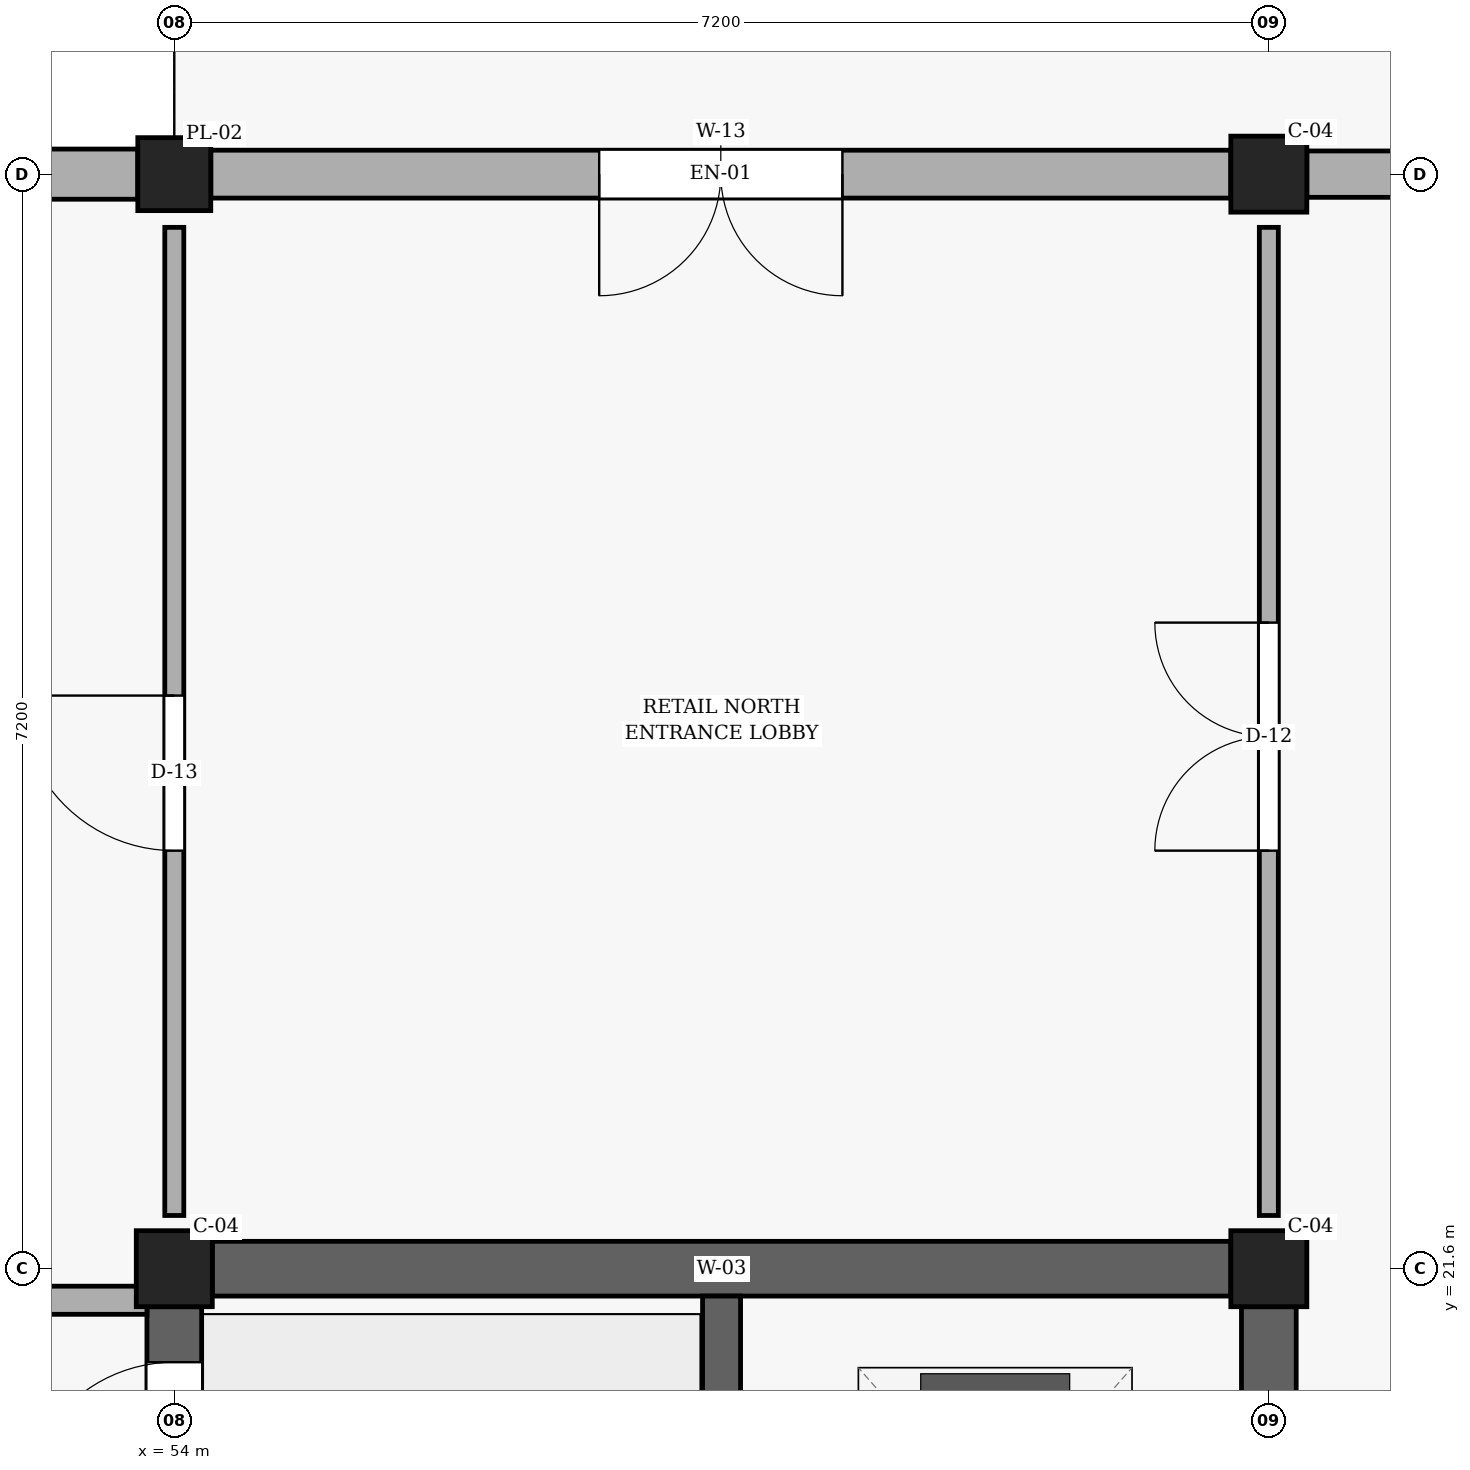
"""IFC4 building model, lengths in metres.
Left out: names, types, materials, properties, quantities, classifications, styles, units other than length and angle.
Written with IfcOpenShell. Run it as: python <this file> out.ifc"""

import sys

from ifc_helpers import new_model, si_unit, direction, frame, frame_2d, origin, origin_2d, place, context, subcontext, project, spatial, rectangle, extrude, element, fill, save


model = new_model("IFC4")
c1 = context("Model", 3, precision=1e-05, world=origin(), true_north=direction((0.0, 1.0)))
c2 = subcontext(c1, "Body", "Model", "MODEL_VIEW")
j1 = project(units=[si_unit("LENGTHUNIT", "METRE"), si_unit("PLANEANGLEUNIT", "RADIAN")], contexts=[c1])
p1 = place(None, origin())
s1 = spatial("IfcSite", under=j1, at=p1, CompositionType="ELEMENT")
p2 = place(p1, origin())
s2 = spatial("IfcBuilding", under=s1, at=p2, CompositionType="ELEMENT")
p3 = place(p2, origin())
s3 = spatial("IfcBuildingStorey", under=s2, at=p3, CompositionType="ELEMENT", Elevation=0.0)
p4 = place(p3, frame((54.0, 21.6, 0.0), z_axis=(0.0, 0.0, 1.0), x_axis=(1.0, 0.0, 0.0)))
e1 = element("IfcColumn", 1, at=p4, inside=s3, PredefinedType="COLUMN", context=c2, shape_type="SweptSolid", body=[
    extrude(rectangle(XDim=0.5, YDim=0.5, at=origin_2d()), origin(), (0.0, 0.0, 1.0), 4.5),
])
p5 = place(p3, frame((54.0, 28.8, 0.0), z_axis=(0.0, 0.0, 1.0), x_axis=(1.0, 0.0, 0.0)))
e2 = element("IfcColumn", 2, at=p5, inside=s3, PredefinedType="PILASTER", context=c2, shape_type="SweptSolid", body=[
    extrude(rectangle(XDim=0.48, YDim=0.48, at=origin_2d()), origin(), (0.0, 0.0, 1.0), 4.5),
])
for number, where, z_axis, x_axis in (
    (3, (61.2, 21.6, 0.0), (0.0, 0.0, 1.0), (1.0, 0.0, 0.0)),
    (4, (61.2, 28.8, 0.0), (0.0, 0.0, 1.0), (1.0, 0.0, 0.0)),
):
    element("IfcColumn", number, at=place(p3, frame(where, z_axis=z_axis, x_axis=x_axis)), inside=s3, PredefinedType="COLUMN", context=c2, shape_type="SweptSolid", body=[
        extrude(rectangle(XDim=0.5, YDim=0.5, at=origin_2d()), origin(), (0.0, 0.0, 1.0), 4.5),
    ])
p6 = place(p3, frame((68.15, 28.8, 0.0), z_axis=(0.0, 0.0, 1.0), x_axis=(-1.0, 0.0, 0.0)))
e5 = element("IfcWall", 5, at=p6, inside=s3, PredefinedType="SOLIDWALL", context=c2, shape_type="SweptSolid", body=[
    extrude(rectangle(XDim=6.7, YDim=0.305, at=frame_2d((3.35, 0.0))), origin(), (0.0, 0.0, 1.0), 3.83),
])
p7 = place(p6, frame((2.45, 0.0, 0.85)))
e6 = element("IfcOpeningElement", 6, at=p7, cuts=e5, PredefinedType="OPENING", context=c2, shape_type="SweptSolid", body=[
    extrude(rectangle(XDim=1.8, YDim=2.1, at=frame_2d((0.9, 1.05))), frame((0.0, 0.163, 0.0), z_axis=(0.0, -1.0, 0.0), x_axis=(1.0, 0.0, 0.0)), (0.0, 0.0, 1.0), 0.325),
])
p8 = place(p3, frame((60.95, 28.8, 0.0), z_axis=(0.0, 0.0, 1.0), x_axis=(-1.0, 0.0, 0.0)))
e7 = element("IfcWall", 7, at=p8, inside=s3, PredefinedType="SOLIDWALL", context=c2, shape_type="SweptSolid", body=[
    extrude(rectangle(XDim=6.71, YDim=0.315, at=frame_2d((3.355, 0.0))), origin(), (0.0, 0.0, 1.0), 3.83),
])
p9 = place(p8, frame((2.555, 0.0, 0.0)))
e8 = element("IfcOpeningElement", 8, at=p9, cuts=e7, PredefinedType="OPENING", context=c2, shape_type="SweptSolid", body=[
    extrude(rectangle(XDim=1.6, YDim=2.25, at=frame_2d((0.8, 1.125))), frame((0.0, 0.167, 0.0), z_axis=(0.0, -1.0, 0.0), x_axis=(1.0, 0.0, 0.0)), (0.0, 0.0, 1.0), 0.335),
])
p10 = place(p3, frame((53.76, 28.8, 0.0), z_axis=(0.0, 0.0, 1.0), x_axis=(-1.0, 0.0, 0.0)))
e9 = element("IfcWall", 9, at=p10, inside=s3, PredefinedType="SOLIDWALL", context=c2, shape_type="SweptSolid", body=[
    extrude(rectangle(XDim=6.71, YDim=0.33, at=frame_2d((3.355, 0.0))), origin(), (0.0, 0.0, 1.0), 3.83),
])
p11 = place(p10, frame((2.305, 0.0, 0.85)))
e10 = element("IfcOpeningElement", 10, at=p11, cuts=e9, PredefinedType="OPENING", context=c2, shape_type="SweptSolid", body=[
    extrude(rectangle(XDim=2.1, YDim=2.1, at=frame_2d((1.05, 1.05))), frame((0.0, 0.175, 0.0), z_axis=(0.0, -1.0, 0.0), x_axis=(1.0, 0.0, 0.0)), (0.0, 0.0, 1.0), 0.35),
])
p12 = place(p3, frame((54.0, 14.65, 0.0), z_axis=(0.0, 0.0, 1.0), x_axis=(0.0, 1.0, 0.0)))
e11 = element("IfcWall", 11, at=p12, inside=s3, PredefinedType="SHEAR", context=c2, shape_type="SweptSolid", body=[
    extrude(rectangle(XDim=6.7, YDim=0.36, at=frame_2d((3.35, 0.0))), origin(), (0.0, 0.0, 1.0), 4.26),
])
p13 = place(p12, frame((5.335, 0.0, 0.0)))
e12 = element("IfcOpeningElement", 12, at=p13, cuts=e11, PredefinedType="OPENING", context=c2, shape_type="SweptSolid", body=[
    extrude(rectangle(XDim=1.0, YDim=2.15, at=frame_2d((0.5, 1.075))), frame((0.0, 0.19, 0.0), z_axis=(0.0, -1.0, 0.0), x_axis=(1.0, 0.0, 0.0)), (0.0, 0.0, 1.0), 0.38),
])
p14 = place(p3, frame((54.25, 21.6, 0.0), z_axis=(0.0, 0.0, 1.0), x_axis=(1.0, 0.0, 0.0)))
e13 = element("IfcWall", 13, at=p14, inside=s3, PredefinedType="SHEAR", context=c2, shape_type="SweptSolid", body=[
    extrude(rectangle(XDim=6.7, YDim=0.36, at=frame_2d((3.35, 0.0))), origin(), (0.0, 0.0, 1.0), 4.26),
])
p15 = place(p3, frame((61.2, 14.65, 0.0), z_axis=(0.0, 0.0, 1.0), x_axis=(0.0, 1.0, 0.0)))
e14 = element("IfcWall", 14, at=p15, inside=s3, PredefinedType="SHEAR", context=c2, shape_type="SweptSolid", body=[
    extrude(rectangle(XDim=6.7, YDim=0.36, at=frame_2d((3.35, 0.0))), origin(), (0.0, 0.0, 1.0), 4.26),
])
p16 = place(p3, frame((57.6, 14.58, 0.0), z_axis=(0.0, 0.0, 1.0), x_axis=(0.0, 1.0, 0.0)))
e15 = element("IfcWall", 15, at=p16, inside=s3, PredefinedType="SHEAR", context=c2, shape_type="SweptSolid", body=[
    extrude(rectangle(XDim=6.84, YDim=0.25, at=frame_2d((3.42, 0.0))), origin(), (0.0, 0.0, 1.0), 4.26),
])
p17 = place(p16, frame((0.42, 0.0, 0.0)))
e16 = element("IfcOpeningElement", 16, at=p17, cuts=e15, PredefinedType="OPENING", context=c2, shape_type="SweptSolid", body=[
    extrude(rectangle(XDim=1.05, YDim=2.15, at=frame_2d((0.525, 1.075))), frame((0.0, 0.135, 0.0), z_axis=(0.0, -1.0, 0.0), x_axis=(1.0, 0.0, 0.0)), (0.0, 0.0, 1.0), 0.27),
])
p18 = place(p3, frame((54.0, 21.95, 0.0), z_axis=(0.0, 0.0, 1.0), x_axis=(0.0, 1.0, 0.0)))
e17 = element("IfcWall", 17, at=p18, inside=s3, PredefinedType="PARTITIONING", context=c2, shape_type="SweptSolid", body=[
    extrude(rectangle(XDim=6.5, YDim=0.125, at=frame_2d((3.25, 0.0))), origin(), (0.0, 0.0, 1.0), 3.41),
])
p19 = place(p18, frame((2.4, 0.0, 0.0)))
e18 = element("IfcOpeningElement", 18, at=p19, cuts=e17, PredefinedType="OPENING", context=c2, shape_type="SweptSolid", body=[
    extrude(rectangle(XDim=1.02, YDim=2.15, at=frame_2d((0.51, 1.075))), frame((0.0, 0.073, 0.0), z_axis=(0.0, -1.0, 0.0), x_axis=(1.0, 0.0, 0.0)), (0.0, 0.0, 1.0), 0.145),
])
p20 = place(p3, frame((61.2, 21.95, 0.0), z_axis=(0.0, 0.0, 1.0), x_axis=(0.0, 1.0, 0.0)))
e19 = element("IfcWall", 19, at=p20, inside=s3, PredefinedType="PARTITIONING", context=c2, shape_type="SweptSolid", body=[
    extrude(rectangle(XDim=6.5, YDim=0.125, at=frame_2d((3.25, 0.0))), origin(), (0.0, 0.0, 1.0), 3.41),
])
p21 = place(p20, frame((2.4, 0.0, 0.0)))
e20 = element("IfcOpeningElement", 20, at=p21, cuts=e19, PredefinedType="OPENING", context=c2, shape_type="SweptSolid", body=[
    extrude(rectangle(XDim=1.5, YDim=2.25, at=frame_2d((0.75, 1.125))), frame((0.0, 0.073, 0.0), z_axis=(0.0, -1.0, 0.0), x_axis=(1.0, 0.0, 0.0)), (0.0, 0.0, 1.0), 0.145),
])
p22 = place(p3, frame((46.96, 21.393, 0.0), z_axis=(0.0, 0.0, 1.0), x_axis=(1.0, 0.0, 0.0)))
e21 = element("IfcWall", 21, at=p22, inside=s3, PredefinedType="PARTITIONING", context=c2, shape_type="SweptSolid", body=[
    extrude(rectangle(XDim=6.86, YDim=0.185, at=frame_2d((3.43, 0.0))), origin(), (0.0, 0.0, 1.0), 3.41),
])
p23 = place(p9, frame((1.6, 0.0, 0.0), z_axis=(0.0, 0.0, 1.0), x_axis=(-1.0, 0.0, 0.0)))
e22 = element("IfcDoor", 22, at=p23, inside=s3, OperationType="DOUBLE_DOOR_SINGLE_SWING", PredefinedType="DOOR", context=c2, shape_type="SweptSolid", body=[
    extrude(rectangle(XDim=1.6, YDim=2.25, at=frame_2d((0.8, 1.125))), frame((0.0, 0.025, 0.0), z_axis=(0.0, -1.0, 0.0), x_axis=(1.0, 0.0, 0.0)), (0.0, 0.0, 1.0), 0.05),
])
fill(e8, e22)
p24 = place(p19, origin())
e23 = element("IfcDoor", 23, at=p24, inside=s3, OperationType="SINGLE_SWING_RIGHT", PredefinedType="DOOR", context=c2, shape_type="SweptSolid", body=[
    extrude(rectangle(XDim=1.02, YDim=2.15, at=frame_2d((0.51, 1.075))), frame((0.0, 0.025, 0.0), z_axis=(0.0, -1.0, 0.0), x_axis=(1.0, 0.0, 0.0)), (0.0, 0.0, 1.0), 0.05),
])
fill(e18, e23)
p25 = place(p21, origin())
e24 = element("IfcDoor", 24, at=p25, inside=s3, OperationType="DOUBLE_DOOR_SINGLE_SWING", PredefinedType="DOOR", context=c2, shape_type="SweptSolid", body=[
    extrude(rectangle(XDim=1.5, YDim=2.25, at=frame_2d((0.75, 1.125))), frame((0.0, 0.025, 0.0), z_axis=(0.0, -1.0, 0.0), x_axis=(1.0, 0.0, 0.0)), (0.0, 0.0, 1.0), 0.05),
])
fill(e20, e24)
p26 = place(p13, origin())
e25 = element("IfcDoor", 25, at=p26, inside=s3, OperationType="SINGLE_SWING_LEFT", PredefinedType="DOOR", context=c2, shape_type="SweptSolid", body=[
    extrude(rectangle(XDim=1.0, YDim=2.15, at=frame_2d((0.5, 1.075))), frame((0.0, 0.025, 0.0), z_axis=(0.0, -1.0, 0.0), x_axis=(1.0, 0.0, 0.0)), (0.0, 0.0, 1.0), 0.05),
])
fill(e12, e25)
save(model, sys.argv[1])
